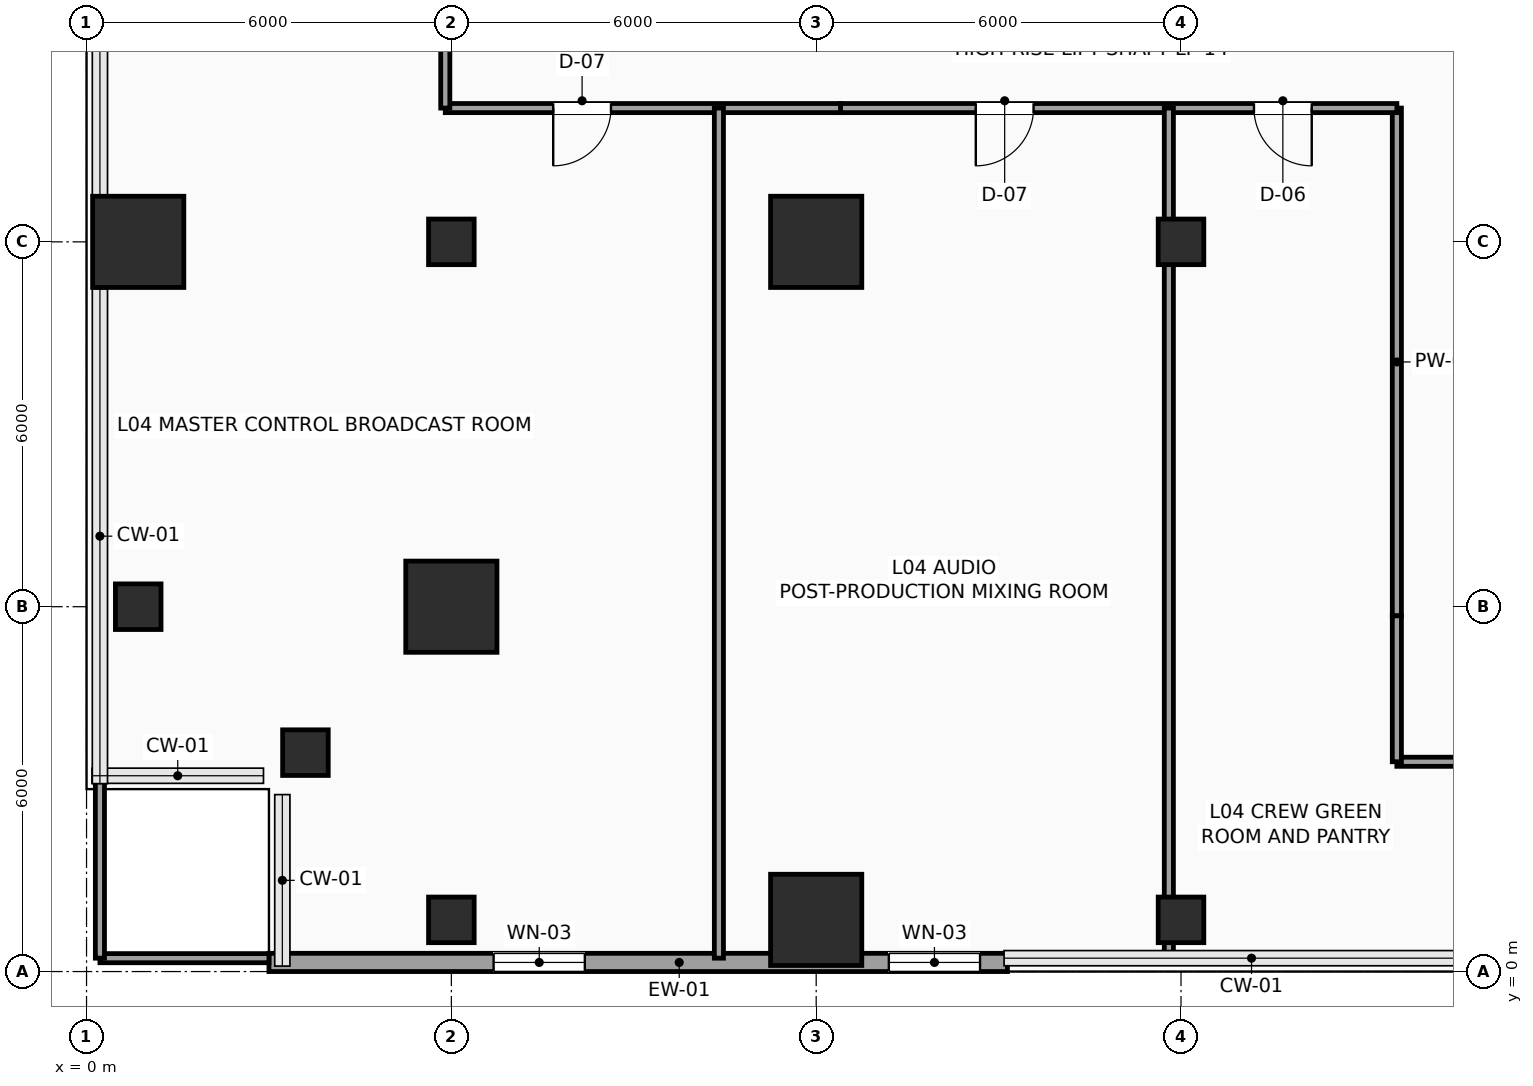
"""IFC4 building model, lengths in metres.
Left out: names, types, materials, properties, quantities, classifications, styles, units other than length and angle.
Written with IfcOpenShell. Run it as: python <this file> out.ifc"""

import sys

from ifc_helpers import new_model, si_unit, direction, frame, frame_2d, origin, origin_2d, place, context, subcontext, project, spatial, rectangle, hollow_rectangle, extrude, element, fill, save


model = new_model("IFC4")
c1 = context("Model", 3, precision=1e-05, world=origin(), true_north=direction((0.0, 1.0)))
c2 = subcontext(c1, "Body", "Model", "MODEL_VIEW")
j1 = project(units=[si_unit("LENGTHUNIT", "METRE"), si_unit("PLANEANGLEUNIT", "RADIAN")], contexts=[c1])
p1 = place(None, origin())
s1 = spatial("IfcSite", under=j1, at=p1, CompositionType="ELEMENT")
p2 = place(p1, origin())
s2 = spatial("IfcBuilding", under=s1, at=p2, CompositionType="ELEMENT")
p3 = place(p2, frame((0.0, 0.0, 21.9)))
s3 = spatial("IfcBuildingStorey", under=s2, at=p3, CompositionType="ELEMENT", Elevation=21.9)
for number, where, z_axis, x_axis in (
    (1, (3.6, 3.6, 0.0), (0.0, 0.0, 1.0), (1.0, 0.0, 0.0)),
    (2, (0.85, 6.0, 0.0), (0.0, 0.0, 1.0), (1.0, 0.0, 0.0)),
):
    element("IfcColumn", number, at=place(p3, frame(where, z_axis=z_axis, x_axis=x_axis)), inside=s3, PredefinedType="COLUMN", context=c2, shape_type="SweptSolid", body=[
        extrude(hollow_rectangle(XDim=0.75, YDim=0.75, WallThickness=0.035, InnerFilletRadius=0.035, OuterFilletRadius=0.05, at=origin_2d()), origin(), (0.0, 0.0, 1.0), 5.7),
    ])
p4 = place(p3, frame((0.85, 12.0, 0.0), z_axis=(0.0, 0.0, 1.0), x_axis=(1.0, 0.0, 0.0)))
e3 = element("IfcColumn", 3, at=p4, inside=s3, PredefinedType="COLUMN", context=c2, shape_type="SweptSolid", body=[
    extrude(rectangle(XDim=1.5, YDim=1.5, at=origin_2d()), origin(), (0.0, 0.0, 1.0), 5.7),
])
p5 = place(p3, frame((6.0, 0.85, 0.0), z_axis=(0.0, 0.0, 1.0), x_axis=(1.0, 0.0, 0.0)))
e4 = element("IfcColumn", 4, at=p5, inside=s3, PredefinedType="COLUMN", context=c2, shape_type="SweptSolid", body=[
    extrude(hollow_rectangle(XDim=0.75, YDim=0.75, WallThickness=0.035, InnerFilletRadius=0.035, OuterFilletRadius=0.05, at=origin_2d()), origin(), (0.0, 0.0, 1.0), 5.7),
])
p6 = place(p3, frame((6.0, 6.0, 0.0), z_axis=(0.0, 0.0, 1.0), x_axis=(1.0, 0.0, 0.0)))
e5 = element("IfcColumn", 5, at=p6, inside=s3, PredefinedType="COLUMN", context=c2, shape_type="SweptSolid", body=[
    extrude(rectangle(XDim=1.5, YDim=1.5, at=origin_2d()), origin(), (0.0, 0.0, 1.0), 5.7),
])
p7 = place(p3, frame((6.0, 12.0, 0.0), z_axis=(0.0, 0.0, 1.0), x_axis=(1.0, 0.0, 0.0)))
e6 = element("IfcColumn", 6, at=p7, inside=s3, PredefinedType="COLUMN", context=c2, shape_type="SweptSolid", body=[
    extrude(hollow_rectangle(XDim=0.75, YDim=0.75, WallThickness=0.035, InnerFilletRadius=0.035, OuterFilletRadius=0.05, at=origin_2d()), origin(), (0.0, 0.0, 1.0), 5.7),
])
for number, where, z_axis, x_axis in (
    (7, (12.0, 0.85, 0.0), (0.0, 0.0, 1.0), (1.0, 0.0, 0.0)),
    (8, (12.0, 12.0, 0.0), (0.0, 0.0, 1.0), (1.0, 0.0, 0.0)),
):
    element("IfcColumn", number, at=place(p3, frame(where, z_axis=z_axis, x_axis=x_axis)), inside=s3, PredefinedType="COLUMN", context=c2, shape_type="SweptSolid", body=[
        extrude(rectangle(XDim=1.5, YDim=1.5, at=origin_2d()), origin(), (0.0, 0.0, 1.0), 5.35),
    ])
for number, where, z_axis, x_axis in (
    (9, (18.0, 0.85, 0.0), (0.0, 0.0, 1.0), (1.0, 0.0, 0.0)),
    (10, (18.0, 12.0, 0.0), (0.0, 0.0, 1.0), (1.0, 0.0, 0.0)),
):
    element("IfcColumn", number, at=place(p3, frame(where, z_axis=z_axis, x_axis=x_axis)), inside=s3, PredefinedType="COLUMN", context=c2, shape_type="SweptSolid", body=[
        extrude(hollow_rectangle(XDim=0.75, YDim=0.75, WallThickness=0.035, InnerFilletRadius=0.035, OuterFilletRadius=0.05, at=origin_2d()), origin(), (0.0, 0.0, 1.0), 5.35),
    ])
p8 = place(p3, frame((15.145, 0.15, 0.0), z_axis=(0.0, 0.0, 1.0), x_axis=(-1.0, 0.0, 0.0)))
e11 = element("IfcWall", 11, at=p8, inside=s3, PredefinedType="SOLIDWALL", context=c2, shape_type="SweptSolid", body=[
    extrude(rectangle(XDim=12.145, YDim=0.3, at=frame_2d((6.073, 0.0))), origin(), (0.0, 0.0, 1.0), 5.35),
])
p9 = place(p8, frame((0.45, 0.0, 1.0)))
e12 = element("IfcOpeningElement", 12, at=p9, cuts=e11, PredefinedType="OPENING", context=c2, shape_type="SweptSolid", body=[
    extrude(rectangle(XDim=1.5, YDim=1.8, at=frame_2d((0.75, 0.9))), frame((0.0, 0.16, 0.0), z_axis=(0.0, -1.0, 0.0), x_axis=(1.0, 0.0, 0.0)), (0.0, 0.0, 1.0), 0.32),
])
p10 = place(p8, frame((6.95, 0.0, 1.0)))
e13 = element("IfcOpeningElement", 13, at=p10, cuts=e11, PredefinedType="OPENING", context=c2, shape_type="SweptSolid", body=[
    extrude(rectangle(XDim=1.5, YDim=1.8, at=frame_2d((0.75, 0.9))), frame((0.0, 0.16, 0.0), z_axis=(0.0, -1.0, 0.0), x_axis=(1.0, 0.0, 0.0)), (0.0, 0.0, 1.0), 0.32),
])
p11 = place(p3, frame((21.55, 5.85, 0.0), z_axis=(0.0, 0.0, 1.0), x_axis=(0.0, 1.0, 0.0)))
e14 = element("IfcWall", 14, at=p11, inside=s3, PredefinedType="PARTITIONING", context=c2, shape_type="SweptSolid", body=[
    extrude(rectangle(XDim=8.35, YDim=0.15, at=frame_2d((4.175, 0.0))), origin(), (0.0, 0.0, 1.0), 5.35),
])
p12 = place(p3, frame((21.55, 14.2, 0.0), z_axis=(0.0, 0.0, 1.0), x_axis=(-1.0, 0.0, 0.0)))
e15 = element("IfcWall", 15, at=p12, inside=s3, PredefinedType="PARTITIONING", context=c2, shape_type="SweptSolid", body=[
    extrude(rectangle(XDim=9.15, YDim=0.15, at=frame_2d((4.575, 0.0))), origin(), (0.0, 0.0, 1.0), 5.35),
])
p13 = place(p12, frame((5.975, 0.0, 0.0)))
e16 = element("IfcOpeningElement", 16, at=p13, cuts=e15, PredefinedType="OPENING", context=c2, shape_type="SweptSolid", body=[
    extrude(rectangle(XDim=0.95, YDim=2.15, at=frame_2d((0.475, 1.075))), frame((0.0, 0.085, 0.0), z_axis=(0.0, -1.0, 0.0), x_axis=(1.0, 0.0, 0.0)), (0.0, 0.0, 1.0), 0.17),
])
p14 = place(p12, frame((1.4, 0.0, 0.0)))
e17 = element("IfcOpeningElement", 17, at=p14, cuts=e15, PredefinedType="OPENING", context=c2, shape_type="SweptSolid", body=[
    extrude(rectangle(XDim=0.95, YDim=2.15, at=frame_2d((0.475, 1.075))), frame((0.0, 0.085, 0.0), z_axis=(0.0, -1.0, 0.0), x_axis=(1.0, 0.0, 0.0)), (0.0, 0.0, 1.0), 0.17),
])
p15 = place(p3, frame((12.4, 14.2, 0.0), z_axis=(0.0, 0.0, 1.0), x_axis=(-1.0, 0.0, 0.0)))
e18 = element("IfcWall", 18, at=p15, inside=s3, PredefinedType="PARTITIONING", context=c2, shape_type="SweptSolid", body=[
    extrude(rectangle(XDim=6.5, YDim=0.15, at=frame_2d((3.25, 0.0))), origin(), (0.0, 0.0, 1.0), 5.35),
])
p16 = place(p15, frame((3.775, 0.0, 0.0)))
e19 = element("IfcOpeningElement", 19, at=p16, cuts=e18, PredefinedType="OPENING", context=c2, shape_type="SweptSolid", body=[
    extrude(rectangle(XDim=0.95, YDim=2.15, at=frame_2d((0.475, 1.075))), frame((0.0, 0.085, 0.0), z_axis=(0.0, -1.0, 0.0), x_axis=(1.0, 0.0, 0.0)), (0.0, 0.0, 1.0), 0.17),
])
p17 = place(p3, frame((5.9, 14.2, 0.0), z_axis=(0.0, 0.0, 1.0), x_axis=(0.0, 1.0, 0.0)))
e20 = element("IfcWall", 20, at=p17, inside=s3, PredefinedType="PARTITIONING", context=c2, shape_type="SweptSolid", body=[
    extrude(rectangle(XDim=2.35, YDim=0.15, at=frame_2d((1.175, 0.0))), origin(), (0.0, 0.0, 1.0), 4.442),
])
p18 = place(p3, frame((23.98, 3.45, 0.0), z_axis=(0.0, 0.0, 1.0), x_axis=(-1.0, 0.0, 0.0)))
e21 = element("IfcWall", 21, at=p18, inside=s3, PredefinedType="PARTITIONING", context=c2, shape_type="SweptSolid", body=[
    extrude(rectangle(XDim=2.43, YDim=0.15, at=frame_2d((1.215, 0.0))), origin(), (0.0, 0.0, 1.0), 4.792),
])
p19 = place(p3, frame((21.55, 3.45, 0.0), z_axis=(0.0, 0.0, 1.0), x_axis=(0.0, 1.0, 0.0)))
e22 = element("IfcWall", 22, at=p19, inside=s3, PredefinedType="PARTITIONING", context=c2, shape_type="SweptSolid", body=[
    extrude(rectangle(XDim=2.4, YDim=0.15, at=frame_2d((1.2, 0.0))), origin(), (0.0, 0.0, 1.0), 5.35),
])
p20 = place(p3, frame((0.22, 0.22, 0.0), z_axis=(0.0, 0.0, 1.0), x_axis=(1.0, 0.0, 0.0)))
e23 = element("IfcWall", 23, at=p20, inside=s3, PredefinedType="PARTITIONING", context=c2, shape_type="SweptSolid", body=[
    extrude(rectangle(XDim=2.78, YDim=0.15, at=frame_2d((1.39, 0.0))), origin(), (0.0, 0.0, 1.0), 5.35),
])
for number, where, z_axis, x_axis in (
    (24, (0.22, 0.22, 0.0), (0.0, 0.0, 1.0), (0.0, 1.0, 0.0)),
    (25, (10.4, 0.22, 0.0), (0.0, 0.0, 1.0), (0.0, 1.0, 0.0)),
):
    element("IfcWall", number, at=place(p3, frame(where, z_axis=z_axis, x_axis=x_axis)), inside=s3, PredefinedType="PARTITIONING", context=c2, shape_type="SweptSolid", body=[
        extrude(rectangle(XDim=13.98, YDim=0.15, at=frame_2d((6.99, 0.0))), origin(), (0.0, 0.0, 1.0), 5.35),
    ])
p21 = place(p3, frame((17.8, 0.22, 0.0), z_axis=(0.0, 0.0, 1.0), x_axis=(0.0, 1.0, 0.0)))
e26 = element("IfcWall", 26, at=p21, inside=s3, PredefinedType="PARTITIONING", context=c2, shape_type="SweptSolid", body=[
    extrude(rectangle(XDim=13.98, YDim=0.15, at=frame_2d((6.99, 0.0))), origin(), (0.0, 0.0, 1.0), 3.542),
])
p22 = place(p9, origin())
e27 = element("IfcWindow", 27, at=p22, inside=s3, PartitioningType="SINGLE_PANEL", PredefinedType="WINDOW", context=c2, shape_type="SweptSolid", body=[
    extrude(rectangle(XDim=1.5, YDim=1.8, at=frame_2d((0.75, 0.9))), frame((0.0, 0.03, 0.0), z_axis=(0.0, -1.0, 0.0), x_axis=(1.0, 0.0, 0.0)), (0.0, 0.0, 1.0), 0.06),
])
fill(e12, e27)
p23 = place(p10, origin())
e28 = element("IfcWindow", 28, at=p23, inside=s3, PartitioningType="SINGLE_PANEL", PredefinedType="WINDOW", context=c2, shape_type="SweptSolid", body=[
    extrude(rectangle(XDim=1.5, YDim=1.8, at=frame_2d((0.75, 0.9))), frame((0.0, 0.03, 0.0), z_axis=(0.0, -1.0, 0.0), x_axis=(1.0, 0.0, 0.0)), (0.0, 0.0, 1.0), 0.06),
])
fill(e13, e28)
p24 = place(p13, origin())
e29 = element("IfcDoor", 29, at=p24, inside=s3, OperationType="SINGLE_SWING_RIGHT", PredefinedType="DOOR", context=c2, shape_type="SweptSolid", body=[
    extrude(rectangle(XDim=0.95, YDim=2.15, at=frame_2d((0.475, 1.075))), frame((0.0, 0.025, 0.0), z_axis=(0.0, -1.0, 0.0), x_axis=(1.0, 0.0, 0.0)), (0.0, 0.0, 1.0), 0.05),
])
fill(e16, e29)
p25 = place(p14, origin())
e30 = element("IfcDoor", 30, at=p25, inside=s3, OperationType="SINGLE_SWING_LEFT", PredefinedType="DOOR", context=c2, shape_type="SweptSolid", body=[
    extrude(rectangle(XDim=0.95, YDim=2.15, at=frame_2d((0.475, 1.075))), frame((0.0, 0.025, 0.0), z_axis=(0.0, -1.0, 0.0), x_axis=(1.0, 0.0, 0.0)), (0.0, 0.0, 1.0), 0.05),
])
fill(e17, e30)
p26 = place(p16, origin())
e31 = element("IfcDoor", 31, at=p26, inside=s3, OperationType="SINGLE_SWING_RIGHT", PredefinedType="DOOR", context=c2, shape_type="SweptSolid", body=[
    extrude(rectangle(XDim=0.95, YDim=2.15, at=frame_2d((0.475, 1.075))), frame((0.0, 0.025, 0.0), z_axis=(0.0, -1.0, 0.0), x_axis=(1.0, 0.0, 0.0)), (0.0, 0.0, 1.0), 0.05),
])
fill(e19, e31)
save(model, sys.argv[1])
